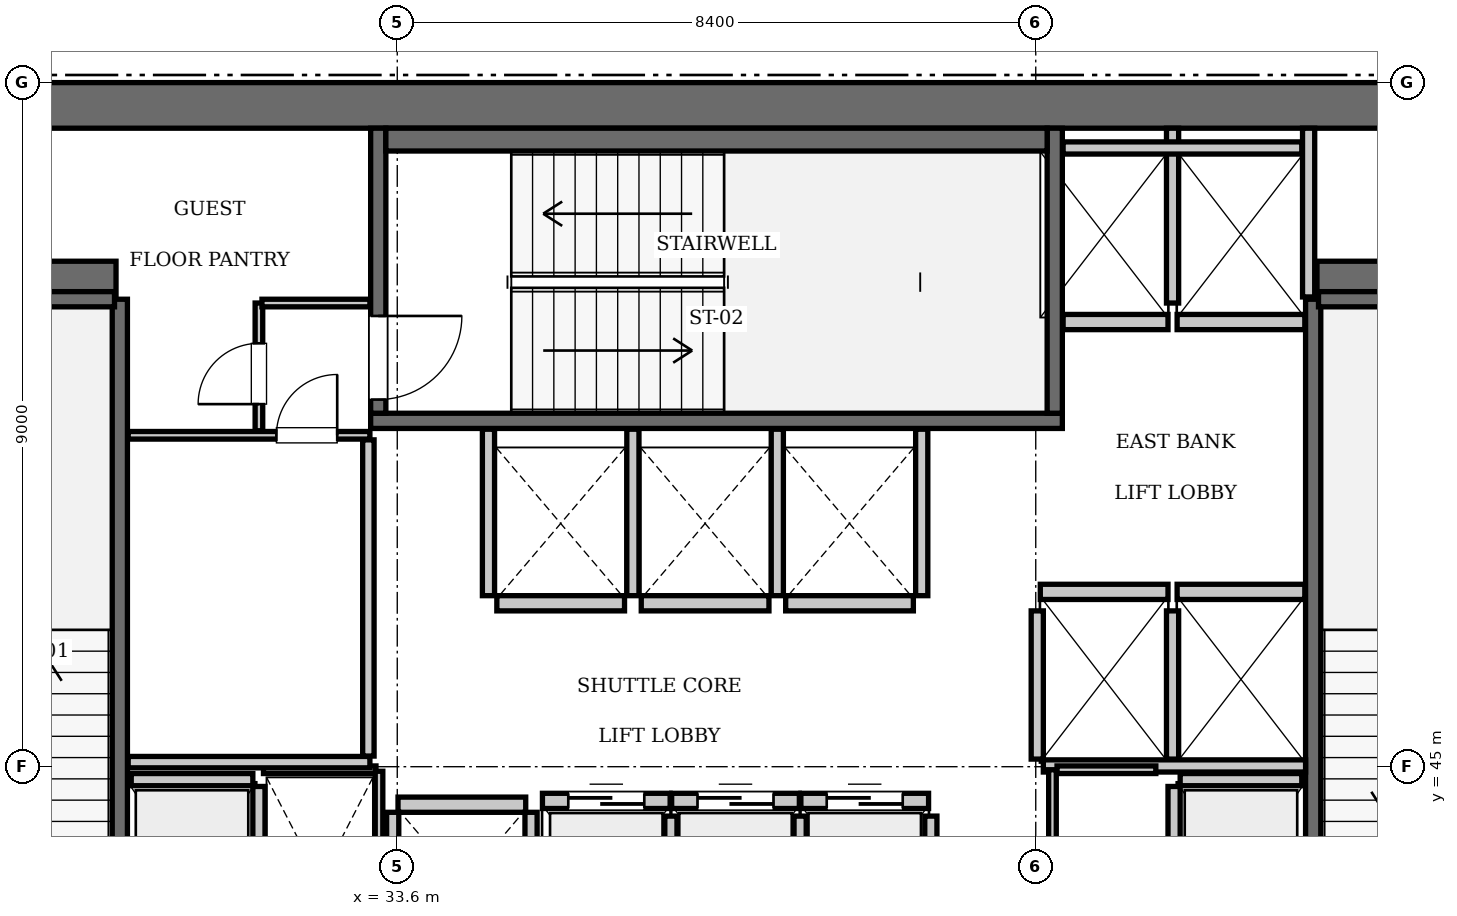
"""IFC4 building model, lengths in metres.
Left out: names, types, materials, properties, quantities, classifications, styles, units other than length and angle.
Written with IfcOpenShell. Run it as: python <this file> out.ifc"""

import sys

from ifc_helpers import new_model, si_unit, direction, frame, frame_2d, origin, place, context, subcontext, project, spatial, rectangle, extrude, element, fill, save


model = new_model("IFC4")
c1 = context("Model", 3, precision=1e-05, world=origin(), true_north=direction((0.0, 1.0)))
c2 = subcontext(c1, "Body", "Model", "MODEL_VIEW")
j1 = project(units=[si_unit("LENGTHUNIT", "METRE"), si_unit("PLANEANGLEUNIT", "RADIAN")], contexts=[c1])
p1 = place(None, origin())
s1 = spatial("IfcSite", under=j1, at=p1, CompositionType="ELEMENT")
p2 = place(p1, origin())
s2 = spatial("IfcBuilding", under=s1, at=p2, CompositionType="ELEMENT")
p3 = place(p2, frame((0.0, 0.0, 239.4)))
s3 = spatial("IfcBuildingStorey", under=s2, at=p3, CompositionType="ELEMENT", Elevation=239.4)
p4 = place(p3, frame((25.2, 53.7, 0.0), z_axis=(0.0, 0.0, 1.0), x_axis=(1.0, 0.0, 0.0)))
e1 = element("IfcWall", 1, at=p4, inside=s3, PredefinedType="SHEAR", context=c2, shape_type="SweptSolid", body=[
    extrude(rectangle(XDim=25.2, YDim=0.6, at=frame_2d((12.6, 0.0))), origin(), (0.0, 0.0, 1.0), 3.85),
])
p5 = place(p3, frame((25.8, 51.4, 0.0), z_axis=(0.0, 0.0, 1.0), x_axis=(1.0, 0.0, 0.0)))
e2 = element("IfcWall", 2, at=p5, inside=s3, PredefinedType="SHEAR", context=c2, shape_type="SweptSolid", body=[
    extrude(rectangle(XDim=4.1, YDim=0.5, at=frame_2d((2.05, 0.0))), origin(), (0.0, 0.0, 1.0), 3.85),
])
p6 = place(p3, frame((45.7, 51.4, 0.0), z_axis=(0.0, 0.0, 1.0), x_axis=(1.0, 0.0, 0.0)))
e3 = element("IfcWall", 3, at=p6, inside=s3, PredefinedType="SHEAR", context=c2, shape_type="SweptSolid", body=[
    extrude(rectangle(XDim=4.1, YDim=0.5, at=frame_2d((2.05, 0.0))), origin(), (0.0, 0.0, 1.0), 3.85),
])
p7 = place(p3, frame((29.95, 42.0, 0.0), z_axis=(0.0, 0.0, 1.0), x_axis=(0.0, 1.0, 0.0)))
e4 = element("IfcWall", 4, at=p7, inside=s3, PredefinedType="SOLIDWALL", context=c2, shape_type="SweptSolid", body=[
    extrude(rectangle(XDim=9.15, YDim=0.2, at=frame_2d((4.575, 0.0))), origin(), (0.0, 0.0, 1.0), 3.61),
])
p8 = place(p3, frame((26.38, 51.15, 0.0), z_axis=(0.0, 0.0, 1.0), x_axis=(1.0, 0.0, 0.0)))
e5 = element("IfcWall", 5, at=p8, inside=s3, PredefinedType="SOLIDWALL", context=c2, shape_type="SweptSolid", body=[
    extrude(rectangle(XDim=3.5, YDim=0.2, at=frame_2d((1.75, 0.0))), origin(), (0.0, 0.0, 1.0), 3.61),
])
p9 = place(p3, frame((33.25, 49.55, 0.0), z_axis=(0.0, 0.0, 1.0), x_axis=(1.0, 0.0, 0.0)))
e6 = element("IfcWall", 6, at=p9, inside=s3, PredefinedType="SOLIDWALL", context=c2, shape_type="SweptSolid", body=[
    extrude(rectangle(XDim=9.1, YDim=0.2, at=frame_2d((4.55, 0.0))), origin(), (0.0, 0.0, 1.0), 3.61),
])
p10 = place(p3, frame((42.25, 49.65, 0.0), z_axis=(0.0, 0.0, 1.0), x_axis=(0.0, 1.0, 0.0)))
e7 = element("IfcWall", 7, at=p10, inside=s3, PredefinedType="SOLIDWALL", context=c2, shape_type="SweptSolid", body=[
    extrude(rectangle(XDim=3.75, YDim=0.2, at=frame_2d((1.875, 0.0))), origin(), (0.0, 0.0, 1.0), 3.61),
])
p11 = place(p3, frame((33.35, 49.65, 0.0), z_axis=(0.0, 0.0, 1.0), x_axis=(0.0, 1.0, 0.0)))
e8 = element("IfcWall", 8, at=p11, inside=s3, PredefinedType="SOLIDWALL", context=c2, shape_type="SweptSolid", body=[
    extrude(rectangle(XDim=3.75, YDim=0.2, at=frame_2d((1.875, 0.0))), origin(), (0.0, 0.0, 1.0), 3.61),
])
p12 = place(p11, frame((0.18, 0.0, 0.0)))
e9 = element("IfcOpeningElement", 9, at=p12, cuts=e8, PredefinedType="OPENING", context=c2, shape_type="SweptSolid", body=[
    extrude(rectangle(XDim=1.1, YDim=2.15, at=frame_2d((0.55, 1.075))), frame((0.0, 0.11, 0.0), z_axis=(0.0, -1.0, 0.0), x_axis=(1.0, 0.0, 0.0)), (0.0, 0.0, 1.0), 0.22),
])
p13 = place(p3, frame((33.45, 53.25, 0.0), z_axis=(0.0, 0.0, 1.0), x_axis=(1.0, 0.0, 0.0)))
e10 = element("IfcWall", 10, at=p13, inside=s3, PredefinedType="SOLIDWALL", context=c2, shape_type="SweptSolid", body=[
    extrude(rectangle(XDim=8.7, YDim=0.3, at=frame_2d((4.35, 0.0))), origin(), (0.0, 0.0, 1.0), 3.61),
])
p14 = place(p3, frame((45.65, 42.0, 0.0), z_axis=(0.0, 0.0, 1.0), x_axis=(0.0, 1.0, 0.0)))
e11 = element("IfcWall", 11, at=p14, inside=s3, PredefinedType="SOLIDWALL", context=c2, shape_type="SweptSolid", body=[
    extrude(rectangle(XDim=9.15, YDim=0.2, at=frame_2d((4.575, 0.0))), origin(), (0.0, 0.0, 1.0), 3.61),
])
p15 = place(p3, frame((45.72, 51.15, 0.0), z_axis=(0.0, 0.0, 1.0), x_axis=(1.0, 0.0, 0.0)))
e12 = element("IfcWall", 12, at=p15, inside=s3, PredefinedType="SOLIDWALL", context=c2, shape_type="SweptSolid", body=[
    extrude(rectangle(XDim=3.5, YDim=0.2, at=frame_2d((1.75, 0.0))), origin(), (0.0, 0.0, 1.0), 3.61),
])
for number, where, z_axis, x_axis in (
    (13, (42.06, 47.3, 0.0), (0.0, 0.0, 1.0), (1.0, 0.0, 0.0)),
    (14, (43.86, 47.3, 0.0), (0.0, 0.0, 1.0), (1.0, 0.0, 0.0)),
):
    element("IfcWall", number, at=place(p3, frame(where, z_axis=z_axis, x_axis=x_axis)), inside=s3, PredefinedType="SOLIDWALL", context=c2, shape_type="SweptSolid", body=[
        extrude(rectangle(XDim=1.68, YDim=0.2, at=frame_2d((0.84, 0.0))), origin(), (0.0, 0.0, 1.0), 3.61),
    ])
p16 = place(p3, frame((42.36, 50.85, 0.0), z_axis=(0.0, 0.0, 1.0), x_axis=(1.0, 0.0, 0.0)))
e15 = element("IfcWall", 15, at=p16, inside=s3, PredefinedType="SOLIDWALL", context=c2, shape_type="SweptSolid", body=[
    extrude(rectangle(XDim=1.38, YDim=0.2, at=frame_2d((0.69, 0.0))), origin(), (0.0, 0.0, 1.0), 3.61),
])
p17 = place(p3, frame((43.86, 50.85, 0.0), z_axis=(0.0, 0.0, 1.0), x_axis=(1.0, 0.0, 0.0)))
e16 = element("IfcWall", 16, at=p17, inside=s3, PredefinedType="SOLIDWALL", context=c2, shape_type="SweptSolid", body=[
    extrude(rectangle(XDim=1.68, YDim=0.2, at=frame_2d((0.84, 0.0))), origin(), (0.0, 0.0, 1.0), 3.61),
])
p18 = place(p3, frame((35.51, 44.55, 0.0), z_axis=(0.0, 0.0, 1.0), x_axis=(1.0, 0.0, 0.0)))
e17 = element("IfcWall", 17, at=p18, inside=s3, PredefinedType="SOLIDWALL", context=c2, shape_type="SweptSolid", body=[
    extrude(rectangle(XDim=1.68, YDim=0.2, at=frame_2d((0.84, 0.0))), origin(), (0.0, 0.0, 1.0), 3.61),
])
p19 = place(p18, frame((0.34, 0.0, 0.0)))
e18 = element("IfcOpeningElement", 18, at=p19, cuts=e17, PredefinedType="OPENING", context=c2, shape_type="SweptSolid", body=[
    extrude(rectangle(XDim=1.0, YDim=2.15, at=frame_2d((0.5, 1.075))), frame((0.0, 0.11, 0.0), z_axis=(0.0, -1.0, 0.0), x_axis=(1.0, 0.0, 0.0)), (0.0, 0.0, 1.0), 0.22),
])
p20 = place(p3, frame((37.21, 44.55, 0.0), z_axis=(0.0, 0.0, 1.0), x_axis=(1.0, 0.0, 0.0)))
e19 = element("IfcWall", 19, at=p20, inside=s3, PredefinedType="SOLIDWALL", context=c2, shape_type="SweptSolid", body=[
    extrude(rectangle(XDim=1.68, YDim=0.2, at=frame_2d((0.84, 0.0))), origin(), (0.0, 0.0, 1.0), 3.61),
])
p21 = place(p20, frame((0.34, 0.0, 0.0)))
e20 = element("IfcOpeningElement", 20, at=p21, cuts=e19, PredefinedType="OPENING", context=c2, shape_type="SweptSolid", body=[
    extrude(rectangle(XDim=1.0, YDim=2.15, at=frame_2d((0.5, 1.075))), frame((0.0, 0.11, 0.0), z_axis=(0.0, -1.0, 0.0), x_axis=(1.0, 0.0, 0.0)), (0.0, 0.0, 1.0), 0.22),
])
p22 = place(p3, frame((38.91, 44.55, 0.0), z_axis=(0.0, 0.0, 1.0), x_axis=(1.0, 0.0, 0.0)))
e21 = element("IfcWall", 21, at=p22, inside=s3, PredefinedType="SOLIDWALL", context=c2, shape_type="SweptSolid", body=[
    extrude(rectangle(XDim=1.68, YDim=0.2, at=frame_2d((0.84, 0.0))), origin(), (0.0, 0.0, 1.0), 3.61),
])
p23 = place(p22, frame((0.34, 0.0, 0.0)))
e22 = element("IfcOpeningElement", 22, at=p23, cuts=e21, PredefinedType="OPENING", context=c2, shape_type="SweptSolid", body=[
    extrude(rectangle(XDim=1.0, YDim=2.15, at=frame_2d((0.5, 1.075))), frame((0.0, 0.11, 0.0), z_axis=(0.0, -1.0, 0.0), x_axis=(1.0, 0.0, 0.0)), (0.0, 0.0, 1.0), 0.22),
])
p24 = place(p3, frame((34.91, 47.15, 0.0), z_axis=(0.0, 0.0, 1.0), x_axis=(1.0, 0.0, 0.0)))
e23 = element("IfcWall", 23, at=p24, inside=s3, PredefinedType="SOLIDWALL", context=c2, shape_type="SweptSolid", body=[
    extrude(rectangle(XDim=1.68, YDim=0.2, at=frame_2d((0.84, 0.0))), origin(), (0.0, 0.0, 1.0), 3.61),
])
for number, where, z_axis, x_axis in (
    (24, (36.81, 47.15, 0.0), (0.0, 0.0, 1.0), (1.0, 0.0, 0.0)),
    (25, (38.71, 47.15, 0.0), (0.0, 0.0, 1.0), (1.0, 0.0, 0.0)),
    (26, (33.61, 44.5, 0.0), (0.0, 0.0, 1.0), (1.0, 0.0, 0.0)),
):
    element("IfcWall", number, at=place(p3, frame(where, z_axis=z_axis, x_axis=x_axis)), inside=s3, PredefinedType="SOLIDWALL", context=c2, shape_type="SweptSolid", body=[
        extrude(rectangle(XDim=1.68, YDim=0.2, at=frame_2d((0.84, 0.0))), origin(), (0.0, 0.0, 1.0), 3.61),
    ])
p25 = place(p3, frame((30.1, 44.83, 0.0), z_axis=(0.0, 0.0, 1.0), x_axis=(1.0, 0.0, 0.0)))
e27 = element("IfcWall", 27, at=p25, inside=s3, PredefinedType="SOLIDWALL", context=c2, shape_type="SweptSolid", body=[
    extrude(rectangle(XDim=1.6, YDim=0.16, at=frame_2d((0.8, 0.0))), origin(), (0.0, 0.0, 1.0), 3.61),
])
p26 = place(p3, frame((31.78, 42.0, 0.0), z_axis=(0.0, 0.0, 1.0), x_axis=(0.0, 1.0, 0.0)))
e28 = element("IfcWall", 28, at=p26, inside=s3, PredefinedType="SOLIDWALL", context=c2, shape_type="SweptSolid", body=[
    extrude(rectangle(XDim=2.74, YDim=0.16, at=frame_2d((1.37, 0.0))), origin(), (0.0, 0.0, 1.0), 3.61),
])
p27 = place(p3, frame((43.9, 44.83, 0.0), z_axis=(0.0, 0.0, 1.0), x_axis=(1.0, 0.0, 0.0)))
e29 = element("IfcWall", 29, at=p27, inside=s3, PredefinedType="SOLIDWALL", context=c2, shape_type="SweptSolid", body=[
    extrude(rectangle(XDim=1.6, YDim=0.16, at=frame_2d((0.8, 0.0))), origin(), (0.0, 0.0, 1.0), 3.61),
])
p28 = place(p3, frame((43.82, 42.0, 0.0), z_axis=(0.0, 0.0, 1.0), x_axis=(0.0, 1.0, 0.0)))
e30 = element("IfcWall", 30, at=p28, inside=s3, PredefinedType="SOLIDWALL", context=c2, shape_type="SweptSolid", body=[
    extrude(rectangle(XDim=2.74, YDim=0.16, at=frame_2d((1.37, 0.0))), origin(), (0.0, 0.0, 1.0), 3.61),
])
for number, where, z_axis, x_axis in (
    (31, (42.02, 45.1, 0.0), (0.0, 0.0, 1.0), (0.0, 1.0, 0.0)),
    (32, (43.8, 45.1, 0.0), (0.0, 0.0, 1.0), (0.0, 1.0, 0.0)),
):
    element("IfcWall", number, at=place(p3, frame(where, z_axis=z_axis, x_axis=x_axis)), inside=s3, PredefinedType="SOLIDWALL", context=c2, shape_type="SweptSolid", body=[
        extrude(rectangle(XDim=1.95, YDim=0.16, at=frame_2d((0.975, 0.0))), origin(), (0.0, 0.0, 1.0), 3.61),
    ])
p29 = place(p3, frame((42.1, 45.01, 0.0), z_axis=(0.0, 0.0, 1.0), x_axis=(1.0, 0.0, 0.0)))
e33 = element("IfcWall", 33, at=p29, inside=s3, PredefinedType="SOLIDWALL", context=c2, shape_type="SweptSolid", body=[
    extrude(rectangle(XDim=3.45, YDim=0.16, at=frame_2d((1.725, 0.0))), origin(), (0.0, 0.0, 1.0), 3.61),
])
p30 = place(p3, frame((45.59, 51.18, 0.0), z_axis=(0.0, 0.0, 1.0), x_axis=(0.0, 1.0, 0.0)))
e34 = element("IfcWall", 34, at=p30, inside=s3, PredefinedType="SOLIDWALL", context=c2, shape_type="SweptSolid", body=[
    extrude(rectangle(XDim=2.22, YDim=0.16, at=frame_2d((1.11, 0.0))), origin(), (0.0, 0.0, 1.0), 3.61),
])
p31 = place(p3, frame((43.8, 51.1, 0.0), z_axis=(0.0, 0.0, 1.0), x_axis=(0.0, 1.0, 0.0)))
e35 = element("IfcWall", 35, at=p31, inside=s3, PredefinedType="SOLIDWALL", context=c2, shape_type="SweptSolid", body=[
    extrude(rectangle(XDim=2.3, YDim=0.16, at=frame_2d((1.15, 0.0))), origin(), (0.0, 0.0, 1.0), 3.61),
])
p32 = place(p3, frame((42.36, 53.14, 0.0), z_axis=(0.0, 0.0, 1.0), x_axis=(1.0, 0.0, 0.0)))
e36 = element("IfcWall", 36, at=p32, inside=s3, PredefinedType="SOLIDWALL", context=c2, shape_type="SweptSolid", body=[
    extrude(rectangle(XDim=3.14, YDim=0.16, at=frame_2d((1.57, 0.0))), origin(), (0.0, 0.0, 1.0), 3.61),
])
for number, where, z_axis, x_axis in (
    (37, (37.2, 42.0, 0.0), (0.0, 0.0, 1.0), (0.0, 1.0, 0.0)),
    (38, (38.9, 42.0, 0.0), (0.0, 0.0, 1.0), (0.0, 1.0, 0.0)),
    (39, (40.62, 42.0, 0.0), (0.0, 0.0, 1.0), (0.0, 1.0, 0.0)),
):
    element("IfcWall", number, at=place(p3, frame(where, z_axis=z_axis, x_axis=x_axis)), inside=s3, PredefinedType="SOLIDWALL", context=c2, shape_type="SweptSolid", body=[
        extrude(rectangle(XDim=2.35, YDim=0.16, at=frame_2d((1.175, 0.0))), origin(), (0.0, 0.0, 1.0), 3.61),
    ])
for number, where, z_axis, x_axis in (
    (40, (34.8, 47.25, 0.0), (0.0, 0.0, 1.0), (0.0, 1.0, 0.0)),
    (41, (36.7, 47.25, 0.0), (0.0, 0.0, 1.0), (0.0, 1.0, 0.0)),
    (42, (38.6, 47.25, 0.0), (0.0, 0.0, 1.0), (0.0, 1.0, 0.0)),
    (43, (40.5, 47.25, 0.0), (0.0, 0.0, 1.0), (0.0, 1.0, 0.0)),
):
    element("IfcWall", number, at=place(p3, frame(where, z_axis=z_axis, x_axis=x_axis)), inside=s3, PredefinedType="SOLIDWALL", context=c2, shape_type="SweptSolid", body=[
        extrude(rectangle(XDim=2.19, YDim=0.16, at=frame_2d((1.095, 0.0))), origin(), (0.0, 0.0, 1.0), 3.61),
    ])
for number, where, z_axis, x_axis in (
    (44, (33.54, 42.0, 0.0), (0.0, 0.0, 1.0), (0.0, 1.0, 0.0)),
    (45, (35.36, 42.0, 0.0), (0.0, 0.0, 1.0), (0.0, 1.0, 0.0)),
):
    element("IfcWall", number, at=place(p3, frame(where, z_axis=z_axis, x_axis=x_axis)), inside=s3, PredefinedType="SOLIDWALL", context=c2, shape_type="SweptSolid", body=[
        extrude(rectangle(XDim=2.4, YDim=0.16, at=frame_2d((1.2, 0.0))), origin(), (0.0, 0.0, 1.0), 3.61),
    ])
p33 = place(p3, frame((31.84, 44.96, 0.0), z_axis=(0.0, 0.0, 1.0), x_axis=(1.0, 0.0, 0.0)))
e46 = element("IfcWall", 46, at=p33, inside=s3, PredefinedType="PARTITIONING", context=c2, shape_type="SweptSolid", body=[
    extrude(rectangle(XDim=1.48, YDim=0.1, at=frame_2d((0.74, 0.0))), origin(), (0.0, 0.0, 1.0), 3.61),
])
p34 = place(p3, frame((33.36, 42.06, 0.0), z_axis=(0.0, 0.0, 1.0), x_axis=(0.0, 1.0, 0.0)))
e47 = element("IfcWall", 47, at=p34, inside=s3, PredefinedType="PARTITIONING", context=c2, shape_type="SweptSolid", body=[
    extrude(rectangle(XDim=2.88, YDim=0.1, at=frame_2d((1.44, 0.0))), origin(), (0.0, 0.0, 1.0), 3.61),
])
p35 = place(p3, frame((42.22, 42.05, 0.0), z_axis=(0.0, 0.0, 1.0), x_axis=(0.0, 1.0, 0.0)))
e48 = element("IfcWall", 48, at=p35, inside=s3, PredefinedType="PARTITIONING", context=c2, shape_type="SweptSolid", body=[
    extrude(rectangle(XDim=2.91, YDim=0.1, at=frame_2d((1.455, 0.0))), origin(), (0.0, 0.0, 1.0), 3.61),
])
p36 = place(p35, frame((0.65, 0.0, 0.0)))
e49 = element("IfcOpeningElement", 49, at=p36, cuts=e48, PredefinedType="OPENING", context=c2, shape_type="SweptSolid", body=[
    extrude(rectangle(XDim=0.8, YDim=2.05, at=frame_2d((0.4, 1.025))), frame((0.0, 0.06, 0.0), z_axis=(0.0, -1.0, 0.0), x_axis=(1.0, 0.0, 0.0)), (0.0, 0.0, 1.0), 0.12),
])
p37 = place(p3, frame((42.28, 44.96, 0.0), z_axis=(0.0, 0.0, 1.0), x_axis=(1.0, 0.0, 0.0)))
e50 = element("IfcWall", 50, at=p37, inside=s3, PredefinedType="PARTITIONING", context=c2, shape_type="SweptSolid", body=[
    extrude(rectangle(XDim=1.3, YDim=0.1, at=frame_2d((0.65, 0.0))), origin(), (0.0, 0.0, 1.0), 3.61),
])
p38 = place(p3, frame((30.06, 45.06, 0.0), z_axis=(0.0, 0.0, 1.0), x_axis=(1.0, 0.0, 0.0)))
e51 = element("IfcWall", 51, at=p38, inside=s3, PredefinedType="PARTITIONING", context=c2, shape_type="SweptSolid", body=[
    extrude(rectangle(XDim=3.18, YDim=0.15, at=frame_2d((1.59, 0.0))), origin(), (0.0, 0.0, 1.0), 3.61),
])
p39 = place(p3, frame((33.22, 45.14, 0.0), z_axis=(0.0, 0.0, 1.0), x_axis=(0.0, 1.0, 0.0)))
e52 = element("IfcWall", 52, at=p39, inside=s3, PredefinedType="PARTITIONING", context=c2, shape_type="SweptSolid", body=[
    extrude(rectangle(XDim=4.16, YDim=0.15, at=frame_2d((2.08, 0.0))), origin(), (0.0, 0.0, 1.0), 3.61),
])
p40 = place(p3, frame((30.06, 49.36, 0.0), z_axis=(0.0, 0.0, 1.0), x_axis=(1.0, 0.0, 0.0)))
e53 = element("IfcWall", 53, at=p40, inside=s3, PredefinedType="PARTITIONING", context=c2, shape_type="SweptSolid", body=[
    extrude(rectangle(XDim=3.18, YDim=0.1, at=frame_2d((1.59, 0.0))), origin(), (0.0, 0.0, 1.0), 3.61),
])
p41 = place(p40, frame((1.95, 0.0, 0.0)))
e54 = element("IfcOpeningElement", 54, at=p41, cuts=e53, PredefinedType="OPENING", context=c2, shape_type="SweptSolid", body=[
    extrude(rectangle(XDim=0.8, YDim=2.05, at=frame_2d((0.4, 1.025))), frame((0.0, 0.06, 0.0), z_axis=(0.0, -1.0, 0.0), x_axis=(1.0, 0.0, 0.0)), (0.0, 0.0, 1.0), 0.12),
])
p42 = place(p3, frame((31.78, 49.42, 0.0), z_axis=(0.0, 0.0, 1.0), x_axis=(0.0, 1.0, 0.0)))
e55 = element("IfcWall", 55, at=p42, inside=s3, PredefinedType="PARTITIONING", context=c2, shape_type="SweptSolid", body=[
    extrude(rectangle(XDim=1.68, YDim=0.1, at=frame_2d((0.84, 0.0))), origin(), (0.0, 0.0, 1.0), 3.61),
])
p43 = place(p42, frame((0.35, 0.0, 0.0)))
e56 = element("IfcOpeningElement", 56, at=p43, cuts=e55, PredefinedType="OPENING", context=c2, shape_type="SweptSolid", body=[
    extrude(rectangle(XDim=0.8, YDim=2.05, at=frame_2d((0.4, 1.025))), frame((0.0, 0.06, 0.0), z_axis=(0.0, -1.0, 0.0), x_axis=(1.0, 0.0, 0.0)), (0.0, 0.0, 1.0), 0.12),
])
p44 = place(p3, frame((31.82, 51.1, 0.0), z_axis=(0.0, 0.0, 1.0), x_axis=(1.0, 0.0, 0.0)))
e57 = element("IfcWall", 57, at=p44, inside=s3, PredefinedType="PARTITIONING", context=c2, shape_type="SweptSolid", body=[
    extrude(rectangle(XDim=1.42, YDim=0.1, at=frame_2d((0.71, 0.0))), origin(), (0.0, 0.0, 1.0), 3.61),
])
p45 = place(p12, frame((1.1, 0.0, 0.0), z_axis=(0.0, 0.0, 1.0), x_axis=(-1.0, 0.0, 0.0)))
e58 = element("IfcDoor", 58, at=p45, inside=s3, OperationType="SINGLE_SWING_LEFT", PredefinedType="DOOR", context=c2, shape_type="SweptSolid", body=[
    extrude(rectangle(XDim=1.1, YDim=2.15, at=frame_2d((0.55, 1.075))), frame((0.0, 0.025, 0.0), z_axis=(0.0, -1.0, 0.0), x_axis=(1.0, 0.0, 0.0)), (0.0, 0.0, 1.0), 0.05),
])
fill(e9, e58)
p46 = place(p19, origin())
e59 = element("IfcDoor", 59, at=p46, inside=s3, OperationType="SLIDING_TO_LEFT", PredefinedType="DOOR", context=c2, shape_type="SweptSolid", body=[
    extrude(rectangle(XDim=1.0, YDim=2.15, at=frame_2d((0.5, 1.075))), frame((0.0, 0.025, 0.0), z_axis=(0.0, -1.0, 0.0), x_axis=(1.0, 0.0, 0.0)), (0.0, 0.0, 1.0), 0.05),
])
fill(e18, e59)
p47 = place(p21, origin())
e60 = element("IfcDoor", 60, at=p47, inside=s3, OperationType="SLIDING_TO_LEFT", PredefinedType="DOOR", context=c2, shape_type="SweptSolid", body=[
    extrude(rectangle(XDim=1.0, YDim=2.15, at=frame_2d((0.5, 1.075))), frame((0.0, 0.025, 0.0), z_axis=(0.0, -1.0, 0.0), x_axis=(1.0, 0.0, 0.0)), (0.0, 0.0, 1.0), 0.05),
])
fill(e20, e60)
p48 = place(p23, origin())
e61 = element("IfcDoor", 61, at=p48, inside=s3, OperationType="SLIDING_TO_LEFT", PredefinedType="DOOR", context=c2, shape_type="SweptSolid", body=[
    extrude(rectangle(XDim=1.0, YDim=2.15, at=frame_2d((0.5, 1.075))), frame((0.0, 0.025, 0.0), z_axis=(0.0, -1.0, 0.0), x_axis=(1.0, 0.0, 0.0)), (0.0, 0.0, 1.0), 0.05),
])
fill(e22, e61)
p49 = place(p41, origin())
e62 = element("IfcDoor", 62, at=p49, inside=s3, OperationType="SINGLE_SWING_RIGHT", PredefinedType="DOOR", context=c2, shape_type="SweptSolid", body=[
    extrude(rectangle(XDim=0.8, YDim=2.05, at=frame_2d((0.4, 1.025))), frame((0.0, 0.025, 0.0), z_axis=(0.0, -1.0, 0.0), x_axis=(1.0, 0.0, 0.0)), (0.0, 0.0, 1.0), 0.05),
])
fill(e54, e62)
p50 = place(p43, origin())
e63 = element("IfcDoor", 63, at=p50, inside=s3, OperationType="SINGLE_SWING_LEFT", PredefinedType="DOOR", context=c2, shape_type="SweptSolid", body=[
    extrude(rectangle(XDim=0.8, YDim=2.05, at=frame_2d((0.4, 1.025))), frame((0.0, 0.025, 0.0), z_axis=(0.0, -1.0, 0.0), x_axis=(1.0, 0.0, 0.0)), (0.0, 0.0, 1.0), 0.05),
])
fill(e56, e63)
save(model, sys.argv[1])
